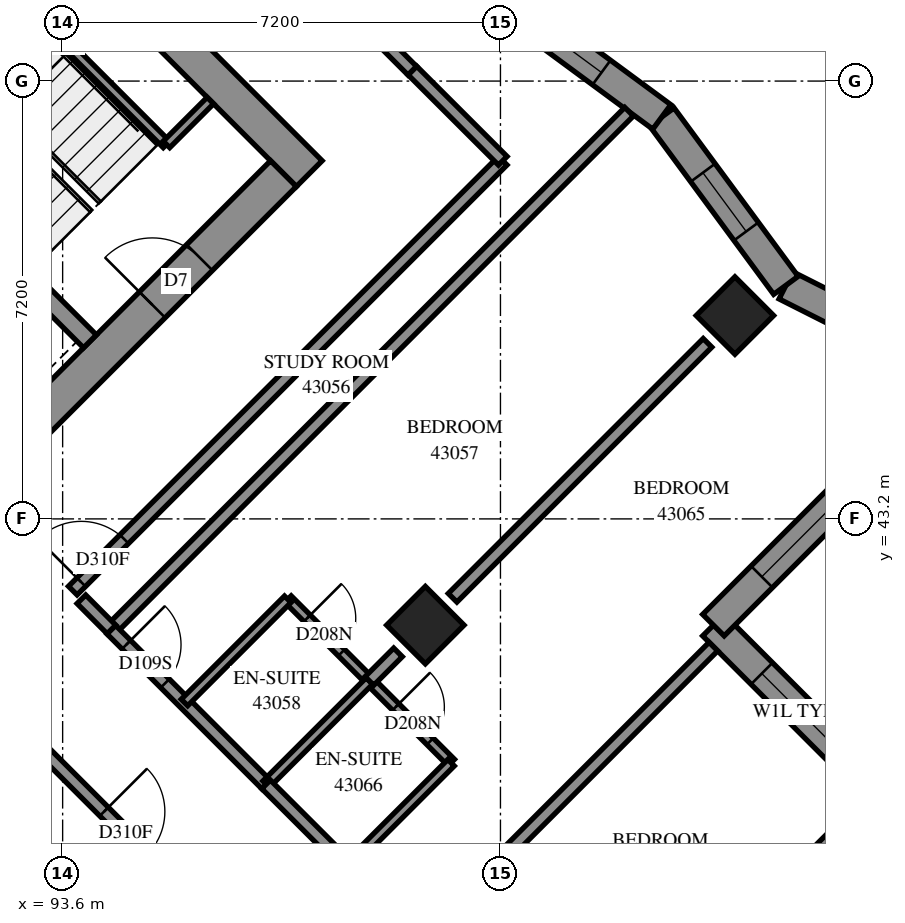
"""IFC4 building model, lengths in metres.
Left out: names, types, materials, properties, quantities, classifications, styles, units other than length and angle.
Written with IfcOpenShell. Run it as: python <this file> out.ifc"""

import sys

from ifc_helpers import new_model, si_unit, direction, frame, frame_2d, origin, origin_2d, place, context, subcontext, project, spatial, polyline, rectangle, outline, extrude, element, fill, save


model = new_model("IFC4")
c1 = context("Model", 3, precision=1e-05, world=origin(), true_north=direction((0.0, 1.0)))
c2 = subcontext(c1, "Body", "Model", "MODEL_VIEW")
j1 = project(units=[si_unit("LENGTHUNIT", "METRE"), si_unit("PLANEANGLEUNIT", "RADIAN")], contexts=[c1])
p1 = place(None, origin())
s1 = spatial("IfcSite", under=j1, at=p1, CompositionType="ELEMENT")
p2 = place(p1, origin())
s2 = spatial("IfcBuilding", under=s1, at=p2, CompositionType="ELEMENT")
p3 = place(p2, frame((0.0, 0.0, 159.2)))
s3 = spatial("IfcBuildingStorey", under=s2, at=p3, CompositionType="ELEMENT", Elevation=159.2)
for number, where, z_axis, x_axis in (
    (1, (104.656, 46.544, 0.0), (0.0, 0.0, 1.0), (0.707, -0.707, 0.0)),
    (2, (99.565, 41.453, 0.0), (0.0, 0.0, 1.0), (0.707, -0.707, 0.0)),
):
    element("IfcColumn", number, at=place(p3, frame(where, z_axis=z_axis, x_axis=x_axis)), inside=s3, PredefinedType="COLUMN", context=c2, shape_type="SweptSolid", body=[
        extrude(rectangle(XDim=0.9, YDim=0.9, at=origin_2d()), origin(), (0.0, 0.0, 1.0), 3.1),
    ])
p4 = place(p3, frame((86.625, 59.908, -0.3), z_axis=(0.0, 0.0, 1.0), x_axis=(0.7071067812, -0.7071067812, 0.0)))
e3 = element("IfcWall", 3, at=p4, inside=s3, PredefinedType="SHEAR", context=c2, shape_type="SweptSolid", body=[
    extrude(rectangle(XDim=15.6, YDim=0.6, at=frame_2d((7.8, 0.0))), origin(), (0.0, 0.0, 1.0), 2.7),
])
p5 = place(p4, frame((10.6, 0.0, 0.3)))
e4 = element("IfcOpeningElement", 4, at=p5, cuts=e3, PredefinedType="OPENING", context=c2, shape_type="SweptSolid", body=[
    extrude(rectangle(XDim=0.8, YDim=2.1, at=frame_2d((0.4, 1.05))), frame((0.0, 0.31, 0.0), z_axis=(0.0, -1.0, 0.0), x_axis=(1.0, 0.0, 0.0)), (0.0, 0.0, 1.0), 0.62),
])
p6 = place(p3, frame((87.049, 38.695, -0.3), z_axis=(0.0, 0.0, 1.0), x_axis=(0.7071067812, 0.7071067812, 0.0)))
e5 = element("IfcWall", 5, at=p6, inside=s3, PredefinedType="SHEAR", context=c2, shape_type="SweptSolid", body=[
    extrude(rectangle(XDim=14.4, YDim=0.6, at=frame_2d((7.2, 0.0))), origin(), (0.0, 0.0, 1.0), 2.7),
])
p7 = place(p6, frame((4.55, 0.0, 0.3)))
e6 = element("IfcOpeningElement", 6, at=p7, cuts=e5, PredefinedType="OPENING", context=c2, shape_type="SweptSolid", body=[
    extrude(rectangle(XDim=1.1, YDim=2.1, at=frame_2d((0.55, 1.05))), frame((0.0, 0.31, 0.0), z_axis=(0.0, -1.0, 0.0), x_axis=(1.0, 0.0, 0.0)), (0.0, 0.0, 1.0), 0.62),
])
p8 = place(p6, frame((11.35, 0.0, 0.3)))
e7 = element("IfcOpeningElement", 7, at=p8, cuts=e5, PredefinedType="OPENING", context=c2, shape_type="SweptSolid", body=[
    extrude(rectangle(XDim=1.1, YDim=2.1, at=frame_2d((0.55, 1.05))), frame((0.0, 0.31, 0.0), z_axis=(0.0, -1.0, 0.0), x_axis=(1.0, 0.0, 0.0)), (0.0, 0.0, 1.0), 0.62),
])
p9 = place(p3, frame((88.958, 51.211, 0.0), z_axis=(0.0, 0.0, 1.0), x_axis=(0.7070998367, -0.7071137256, 0.0)))
e8 = element("IfcWall", 8, at=p9, inside=s3, PredefinedType="SOLIDWALL", context=c2, shape_type="SweptSolid", body=[
    extrude(rectangle(XDim=7.2, YDim=0.3, at=frame_2d((3.6, 0.0))), origin(), (0.0, 0.0, 1.0), 3.1),
])
p10 = place(p3, frame((105.959, 32.962, 0.0), z_axis=(0.0, 0.0, 1.0), x_axis=(0.3371362761, 0.9414558574, 0.0)))
e9 = element("IfcWall", 9, at=p10, inside=s3, PredefinedType="SOLIDWALL", context=c2, shape_type="SweptSolid", body=[
    extrude(outline(polyline([(-0.113, -0.25), (5.503, -0.25), (5.187, 0.25), (0.113, 0.25), (-0.113, -0.25)])), origin(), (0.0, 0.0, 1.0), 3.1),
])
p11 = place(p10, frame((1.17, 0.0, 0.45)))
e10 = element("IfcOpeningElement", 10, at=p11, cuts=e9, PredefinedType="OPENING", context=c2, shape_type="SweptSolid", body=[
    extrude(rectangle(XDim=1.2, YDim=2.5, at=frame_2d((0.6, 1.25))), frame((0.0, 0.26, 0.0), z_axis=(0.0, -1.0, 0.0), x_axis=(1.0, 0.0, 0.0)), (0.0, 0.0, 1.0), 0.52),
])
p12 = place(p10, frame((3.507, 0.0, 0.45)))
e11 = element("IfcOpeningElement", 11, at=p12, cuts=e9, PredefinedType="OPENING", context=c2, shape_type="SweptSolid", body=[
    extrude(rectangle(XDim=1.2, YDim=2.5, at=frame_2d((0.6, 1.25))), frame((0.0, 0.26, 0.0), z_axis=(0.0, -1.0, 0.0), x_axis=(1.0, 0.0, 0.0)), (0.0, 0.0, 1.0), 0.52),
])
p13 = place(p3, frame((107.761, 37.994, 0.0), z_axis=(0.0, 0.0, 1.0), x_axis=(-0.7071170025, 0.7070965597, 0.0)))
e12 = element("IfcWall", 12, at=p13, inside=s3, PredefinedType="SOLIDWALL", context=c2, shape_type="SweptSolid", body=[
    extrude(outline(polyline([(-0.158, -0.25), (4.642, -0.25), (5.142, 0.25), (0.158, 0.25), (-0.158, -0.25)])), origin(), (0.0, 0.0, 1.0), 3.1),
])
p14 = place(p13, frame((1.967, 0.0, 0.6)))
e13 = element("IfcOpeningElement", 13, at=p14, cuts=e12, PredefinedType="OPENING", context=c2, shape_type="SweptSolid", body=[
    extrude(rectangle(XDim=1.8, YDim=1.9, at=frame_2d((0.9, 0.95))), frame((0.0, 0.26, 0.0), z_axis=(0.0, -1.0, 0.0), x_axis=(1.0, 0.0, 0.0)), (0.0, 0.0, 1.0), 0.52),
])
p15 = place(p3, frame((104.302, 41.453, 0.0), z_axis=(0.0, 0.0, 1.0), x_axis=(0.707123973, 0.707089589, 0.0)))
e14 = element("IfcWall", 14, at=p15, inside=s3, PredefinedType="SOLIDWALL", context=c2, shape_type="SweptSolid", body=[
    extrude(outline(polyline([(0.25, -0.25), (6.162, -0.25), (5.471, 0.25), (-0.25, 0.25), (0.25, -0.25)])), origin(), (0.0, 0.0, 1.0), 3.1),
])
p16 = place(p15, frame((1.125, 0.0, 0.6)))
e15 = element("IfcOpeningElement", 15, at=p16, cuts=e14, PredefinedType="OPENING", context=c2, shape_type="SweptSolid", body=[
    extrude(rectangle(XDim=1.8, YDim=1.9, at=frame_2d((0.9, 0.95))), frame((0.0, 0.26, 0.0), z_axis=(0.0, -1.0, 0.0), x_axis=(1.0, 0.0, 0.0)), (0.0, 0.0, 1.0), 0.52),
])
p17 = place(p15, frame((3.961, 0.0, 0.6)))
e16 = element("IfcOpeningElement", 16, at=p17, cuts=e14, PredefinedType="OPENING", context=c2, shape_type="SweptSolid", body=[
    extrude(rectangle(XDim=1.2, YDim=1.9, at=frame_2d((0.6, 0.95))), frame((0.0, 0.26, 0.0), z_axis=(0.0, -1.0, 0.0), x_axis=(1.0, 0.0, 0.0)), (0.0, 0.0, 1.0), 0.52),
])
p18 = place(p3, frame((108.415, 45.566, 0.0), z_axis=(0.0, 0.0, 1.0), x_axis=(-0.8926785051, 0.4506940054, 0.0)))
e17 = element("IfcWall", 17, at=p18, inside=s3, PredefinedType="SOLIDWALL", context=c2, shape_type="SweptSolid", body=[
    extrude(outline(polyline([(-0.345, -0.25), (3.213, -0.25), (3.332, 0.25), (0.345, 0.25), (-0.345, -0.25)])), origin(), (0.0, 0.0, 1.0), 3.1),
])
p19 = place(p18, frame((1.209, 0.0, 0.45)))
e18 = element("IfcOpeningElement", 18, at=p19, cuts=e17, PredefinedType="OPENING", context=c2, shape_type="SweptSolid", body=[
    extrude(rectangle(XDim=1.2, YDim=2.5, at=frame_2d((0.6, 1.25))), frame((0.0, 0.26, 0.0), z_axis=(0.0, -1.0, 0.0), x_axis=(1.0, 0.0, 0.0)), (0.0, 0.0, 1.0), 0.52),
])
p20 = place(p3, frame((105.494, 47.041, 0.0), z_axis=(0.0, 0.0, 1.0), x_axis=(-0.5932158949, 0.8050434162, 0.0)))
e19 = element("IfcWall", 19, at=p20, inside=s3, PredefinedType="SOLIDWALL", context=c2, shape_type="SweptSolid", body=[
    extrude(outline(polyline([(0.06, -0.25), (3.478, -0.25), (3.402, 0.25), (-0.06, 0.25), (0.06, -0.25)])), origin(), (0.0, 0.0, 1.0), 3.1),
])
p21 = place(p20, frame((1.101, 0.0, 0.45)))
e20 = element("IfcOpeningElement", 20, at=p21, cuts=e19, PredefinedType="OPENING", context=c2, shape_type="SweptSolid", body=[
    extrude(rectangle(XDim=1.2, YDim=2.5, at=frame_2d((0.6, 1.25))), frame((0.0, 0.26, 0.0), z_axis=(0.0, -1.0, 0.0), x_axis=(1.0, 0.0, 0.0)), (0.0, 0.0, 1.0), 0.52),
])
p22 = place(p3, frame((103.454, 49.81, 0.0), z_axis=(0.0, 0.0, 1.0), x_axis=(-0.8050440725, 0.5932150043, 0.0)))
e21 = element("IfcWall", 21, at=p22, inside=s3, PredefinedType="SOLIDWALL", context=c2, shape_type="SweptSolid", body=[
    extrude(outline(polyline([(-0.038, -0.25), (3.381, -0.25), (3.456, 0.25), (0.038, 0.25), (-0.038, -0.25)])), origin(), (0.0, 0.0, 1.0), 3.1),
])
p23 = place(p22, frame((1.232, 0.0, 0.45)))
e22 = element("IfcOpeningElement", 22, at=p23, cuts=e21, PredefinedType="OPENING", context=c2, shape_type="SweptSolid", body=[
    extrude(rectangle(XDim=1.2, YDim=2.5, at=frame_2d((0.6, 1.25))), frame((0.0, 0.26, 0.0), z_axis=(0.0, -1.0, 0.0), x_axis=(1.0, 0.0, 0.0)), (0.0, 0.0, 1.0), 0.52),
])
p24 = place(p3, frame((91.313, 53.354, 0.0), z_axis=(0.0, 0.0, 1.0), x_axis=(0.7071067812, -0.7071067812, 0.0)))
e23 = element("IfcWall", 23, at=p24, inside=s3, PredefinedType="PARTITIONING", context=c2, shape_type="SweptSolid", body=[
    extrude(rectangle(XDim=5.65, YDim=0.15, at=frame_2d((2.825, 0.0))), origin(), (0.0, 0.0, 1.0), 3.1),
])
p25 = place(p3, frame((95.308, 49.358, 0.0), z_axis=(0.0, 0.0, 1.0), x_axis=(0.70705776, 0.707155799, 0.0)))
e24 = element("IfcWall", 24, at=p25, inside=s3, PredefinedType="PARTITIONING", context=c2, shape_type="SweptSolid", body=[
    extrude(rectangle(XDim=1.02, YDim=0.15, at=frame_2d((0.51, 0.0))), origin(), (0.0, 0.0, 1.0), 3.1),
])
p26 = place(p3, frame((94.401, 41.383, 0.0), z_axis=(0.0, 0.0, 1.0), x_axis=(0.7071067812, 0.7071067812, 0.0)))
e25 = element("IfcWall", 25, at=p26, inside=s3, PredefinedType="PARTITIONING", context=c2, shape_type="SweptSolid", body=[
    extrude(rectangle(XDim=12.04, YDim=0.2, at=frame_2d((6.02, 0.0))), origin(), (0.0, 0.0, 1.0), 3.1),
])
p27 = place(p3, frame((92.209, 40.459, 0.0), z_axis=(0.0, 0.0, 1.0), x_axis=(0.7071067812, -0.7071067812, 0.0)))
e26 = element("IfcWall", 26, at=p27, inside=s3, PredefinedType="PARTITIONING", context=c2, shape_type="SweptSolid", body=[
    extrude(rectangle(XDim=11.698, YDim=0.2, at=frame_2d((5.849, 0.0))), origin(), (0.0, 0.0, 1.0), 3.1),
])
p28 = place(p27, frame((2.931, 0.0, 0.0)))
e27 = element("IfcOpeningElement", 27, at=p28, cuts=e26, PredefinedType="OPENING", context=c2, shape_type="SweptSolid", body=[
    extrude(rectangle(XDim=1.0, YDim=2.1, at=frame_2d((0.5, 1.05))), frame((0.0, 0.11, 0.0), z_axis=(0.0, -1.0, 0.0), x_axis=(1.0, 0.0, 0.0)), (0.0, 0.0, 1.0), 0.22),
])
p29 = place(p27, frame((10.223, 0.0, 0.0)))
e28 = element("IfcOpeningElement", 28, at=p29, cuts=e26, PredefinedType="OPENING", context=c2, shape_type="SweptSolid", body=[
    extrude(rectangle(XDim=0.9, YDim=2.1, at=frame_2d((0.45, 1.05))), frame((0.0, 0.11, 0.0), z_axis=(0.0, -1.0, 0.0), x_axis=(1.0, 0.0, 0.0)), (0.0, 0.0, 1.0), 0.22),
])
p30 = place(p3, frame((93.767, 42.021, 0.0), z_axis=(0.0, 0.0, 1.0), x_axis=(0.7071067812, 0.7071067812, 0.0)))
e29 = element("IfcWall", 29, at=p30, inside=s3, PredefinedType="PARTITIONING", context=c2, shape_type="SweptSolid", body=[
    extrude(rectangle(XDim=9.998, YDim=0.2, at=frame_2d((4.999, 0.0))), origin(), (0.0, 0.0, 1.0), 3.1),
])
p31 = place(p30, frame((0.196, 0.0, 0.0)))
e30 = element("IfcOpeningElement", 30, at=p31, cuts=e29, PredefinedType="OPENING", context=c2, shape_type="SweptSolid", body=[
    extrude(rectangle(XDim=1.0, YDim=2.1, at=frame_2d((0.5, 1.05))), frame((0.0, 0.11, 0.0), z_axis=(0.0, -1.0, 0.0), x_axis=(1.0, 0.0, 0.0)), (0.0, 0.0, 1.0), 0.22),
])
p32 = place(p3, frame((99.494, 36.292, 0.0), z_axis=(0.0, 0.0, 1.0), x_axis=(0.7071067812, 0.7071067812, 0.0)))
e31 = element("IfcWall", 31, at=p32, inside=s3, PredefinedType="PARTITIONING", context=c2, shape_type="SweptSolid", body=[
    extrude(rectangle(XDim=6.799, YDim=0.2, at=frame_2d((3.4, 0.0))), origin(), (0.0, 0.0, 1.0), 3.1),
])
p33 = place(p3, frame((100.013, 41.903, 0.0), z_axis=(0.0, 0.0, 1.0), x_axis=(0.7071067812, 0.7071067812, 0.0)))
e32 = element("IfcWall", 32, at=p33, inside=s3, PredefinedType="PARTITIONING", context=c2, shape_type="SweptSolid", body=[
    extrude(rectangle(XDim=5.928, YDim=0.2, at=frame_2d((2.964, 0.0))), origin(), (0.0, 0.0, 1.0), 3.1),
])
p34 = place(p3, frame((97.305, 41.881, 0.0), z_axis=(0.0, 0.0, 1.0), x_axis=(0.7067382634, -0.707475107, 0.0)))
e33 = element("IfcWall", 33, at=p34, inside=s3, PredefinedType="PARTITIONING", context=c2, shape_type="SweptSolid", body=[
    extrude(rectangle(XDim=3.8, YDim=0.15, at=frame_2d((1.9, 0.0))), origin(), (0.0, 0.0, 1.0), 3.1),
])
p35 = place(p34, frame((0.445, 0.0, 0.0)))
e34 = element("IfcOpeningElement", 34, at=p35, cuts=e33, PredefinedType="OPENING", context=c2, shape_type="SweptSolid", body=[
    extrude(rectangle(XDim=0.8, YDim=2.1, at=frame_2d((0.4, 1.05))), frame((0.0, 0.085, 0.0), z_axis=(0.0, -1.0, 0.0), x_axis=(1.0, 0.0, 0.0)), (0.0, 0.0, 1.0), 0.17),
])
p36 = place(p34, frame((2.507, 0.0, 0.0)))
e35 = element("IfcOpeningElement", 35, at=p36, cuts=e33, PredefinedType="OPENING", context=c2, shape_type="SweptSolid", body=[
    extrude(rectangle(XDim=0.8, YDim=2.1, at=frame_2d((0.4, 1.05))), frame((0.0, 0.085, 0.0), z_axis=(0.0, -1.0, 0.0), x_axis=(1.0, 0.0, 0.0)), (0.0, 0.0, 1.0), 0.17),
])
p37 = place(p3, frame((94.399, 41.379, 0.0), z_axis=(0.0, 0.0, 1.0), x_axis=(0.7071067812, -0.7071067812, 0.0)))
e36 = element("IfcWall", 36, at=p37, inside=s3, PredefinedType="PARTITIONING", context=c2, shape_type="SweptSolid", body=[
    extrude(rectangle(XDim=3.601, YDim=0.2, at=frame_2d((1.8, 0.0))), origin(), (0.0, 0.0, 1.0), 3.1),
])
p38 = place(p37, frame((0.35, 0.0, 0.0)))
e37 = element("IfcOpeningElement", 37, at=p38, cuts=e36, PredefinedType="OPENING", context=c2, shape_type="SweptSolid", body=[
    extrude(rectangle(XDim=0.9, YDim=2.1, at=frame_2d((0.45, 1.05))), frame((0.0, 0.11, 0.0), z_axis=(0.0, -1.0, 0.0), x_axis=(1.0, 0.0, 0.0)), (0.0, 0.0, 1.0), 0.22),
])
p39 = place(p3, frame((105.105, 36.813, 0.0), z_axis=(0.0, 0.0, 1.0), x_axis=(0.7071067812, 0.7071067812, 0.0)))
e38 = element("IfcWall", 38, at=p39, inside=s3, PredefinedType="PARTITIONING", context=c2, shape_type="SweptSolid", body=[
    extrude(rectangle(XDim=2.463, YDim=0.2, at=frame_2d((1.232, 0.0))), origin(), (0.0, 0.0, 1.0), 3.1),
])
for number, where, z_axis, x_axis in (
    (39, (95.603, 40.181, 0.0), (0.0, 0.0, 1.0), (0.707, 0.707, 0.0)),
    (40, (96.947, 38.837, 0.0), (0.0, 0.0, 1.0), (0.707, 0.707, 0.0)),
):
    element("IfcWall", number, at=place(p3, frame(where, z_axis=z_axis, x_axis=x_axis)), inside=s3, PredefinedType="PARTITIONING", context=c2, shape_type="SweptSolid", body=[
        extrude(rectangle(XDim=2.401, YDim=0.15, at=frame_2d((1.201, 0.0))), origin(), (0.0, 0.0, 1.0), 3.1),
    ])
p40 = place(p3, frame((98.291, 37.495, 0.0), z_axis=(0.0, 0.0, 1.0), x_axis=(0.7071067812, 0.7071067812, 0.0)))
e41 = element("IfcWall", 41, at=p40, inside=s3, PredefinedType="PARTITIONING", context=c2, shape_type="SweptSolid", body=[
    extrude(rectangle(XDim=2.398, YDim=0.15, at=frame_2d((1.199, 0.0))), origin(), (0.0, 0.0, 1.0), 3.1),
])
p41 = place(p3, frame((99.352, 50.574, 0.0), z_axis=(0.0, 0.0, 1.0), x_axis=(0.7075827869, -0.7066304548, 0.0)))
e42 = element("IfcWall", 42, at=p41, inside=s3, PredefinedType="PARTITIONING", context=c2, shape_type="SweptSolid", body=[
    extrude(rectangle(XDim=2.1, YDim=0.2, at=frame_2d((1.05, 0.0))), origin(), (0.0, 0.0, 1.0), 3.1),
])
p42 = place(p3, frame((96.946, 38.834, 0.0), z_axis=(0.0, 0.0, 1.0), x_axis=(0.7076330979, -0.7065800724, 0.0)))
e43 = element("IfcWall", 43, at=p42, inside=s3, PredefinedType="PARTITIONING", context=c2, shape_type="SweptSolid", body=[
    extrude(rectangle(XDim=1.899, YDim=0.2, at=frame_2d((0.95, 0.0))), origin(), (0.0, 0.0, 1.0), 3.1),
])
p43 = place(p3, frame((93.909, 41.879, 0.0), z_axis=(0.0, 0.0, 1.0), x_axis=(0.7056768426, -0.7085338339, 0.0)))
e44 = element("IfcWall", 44, at=p43, inside=s3, PredefinedType="PARTITIONING", context=c2, shape_type="SweptSolid", body=[
    extrude(rectangle(XDim=0.7, YDim=0.2, at=frame_2d((0.35, 0.0))), origin(), (0.0, 0.0, 1.0), 3.1),
])
p44 = place(p3, frame((98.645, 40.535, 0.0), z_axis=(0.0, 0.0, 1.0), x_axis=(0.7071067812, 0.7071067812, 0.0)))
e45 = element("IfcWall", 45, at=p44, inside=s3, PredefinedType="PARTITIONING", context=c2, shape_type="SweptSolid", body=[
    extrude(rectangle(XDim=0.665, YDim=0.2, at=frame_2d((0.332, 0.0))), origin(), (0.0, 0.0, 1.0), 3.1),
])
p45 = place(p3, frame((98.925, 50.995, 0.0), z_axis=(0.0, 0.0, 1.0), x_axis=(0.7071067812, -0.7071067812, 0.0)))
e46 = element("IfcWall", 46, at=p45, inside=s3, PredefinedType="PARTITIONING", context=c2, shape_type="SweptSolid", body=[
    extrude(rectangle(XDim=0.6, YDim=0.2, at=frame_2d((0.3, 0.0))), origin(), (0.0, 0.0, 1.0), 3.1),
])
p46 = place(p14, origin())
e47 = element("IfcWindow", 47, at=p46, inside=s3, PartitioningType="SINGLE_PANEL", PredefinedType="WINDOW", context=c2, shape_type="SweptSolid", body=[
    extrude(rectangle(XDim=1.8, YDim=1.9, at=frame_2d((0.9, 0.95))), frame((0.0, 0.18, 0.0), z_axis=(0.0, -1.0, 0.0), x_axis=(1.0, 0.0, 0.0)), (0.0, 0.0, 1.0), 0.06),
])
fill(e13, e47)
p47 = place(p16, origin())
e48 = element("IfcWindow", 48, at=p47, inside=s3, PartitioningType="SINGLE_PANEL", PredefinedType="WINDOW", context=c2, shape_type="SweptSolid", body=[
    extrude(rectangle(XDim=1.8, YDim=1.9, at=frame_2d((0.9, 0.95))), frame((0.0, 0.18, 0.0), z_axis=(0.0, -1.0, 0.0), x_axis=(1.0, 0.0, 0.0)), (0.0, 0.0, 1.0), 0.06),
])
fill(e15, e48)
p48 = place(p21, origin())
e49 = element("IfcWindow", 49, at=p48, inside=s3, PartitioningType="SINGLE_PANEL", PredefinedType="WINDOW", context=c2, shape_type="SweptSolid", body=[
    extrude(rectangle(XDim=1.2, YDim=2.5, at=frame_2d((0.6, 1.25))), frame((0.0, 0.18, 0.0), z_axis=(0.0, -1.0, 0.0), x_axis=(1.0, 0.0, 0.0)), (0.0, 0.0, 1.0), 0.06),
])
fill(e20, e49)
p49 = place(p23, origin())
e50 = element("IfcWindow", 50, at=p49, inside=s3, PartitioningType="SINGLE_PANEL", PredefinedType="WINDOW", context=c2, shape_type="SweptSolid", body=[
    extrude(rectangle(XDim=1.2, YDim=2.5, at=frame_2d((0.6, 1.25))), frame((0.0, 0.18, 0.0), z_axis=(0.0, -1.0, 0.0), x_axis=(1.0, 0.0, 0.0)), (0.0, 0.0, 1.0), 0.06),
])
fill(e22, e50)
p50 = place(p8, origin())
e51 = element("IfcDoor", 51, at=p50, inside=s3, OperationType="SINGLE_SWING_RIGHT", PredefinedType="DOOR", context=c2, shape_type="SweptSolid", body=[
    extrude(rectangle(XDim=1.1, YDim=2.1, at=frame_2d((0.55, 1.05))), frame((0.0, 0.025, 0.0), z_axis=(0.0, -1.0, 0.0), x_axis=(1.0, 0.0, 0.0)), (0.0, 0.0, 1.0), 0.05),
])
fill(e7, e51)
p51 = place(p31, origin())
e52 = element("IfcDoor", 52, at=p51, inside=s3, OperationType="SINGLE_SWING_LEFT", PredefinedType="DOOR", context=c2, shape_type="SweptSolid", body=[
    extrude(rectangle(XDim=1.0, YDim=2.1, at=frame_2d((0.5, 1.05))), frame((0.0, 0.025, 0.0), z_axis=(0.0, -1.0, 0.0), x_axis=(1.0, 0.0, 0.0)), (0.0, 0.0, 1.0), 0.05),
])
fill(e30, e52)
p52 = place(p38, origin())
e53 = element("IfcDoor", 53, at=p52, inside=s3, OperationType="SINGLE_SWING_RIGHT", PredefinedType="DOOR", context=c2, shape_type="SweptSolid", body=[
    extrude(rectangle(XDim=0.9, YDim=2.1, at=frame_2d((0.45, 1.05))), frame((0.0, 0.025, 0.0), z_axis=(0.0, -1.0, 0.0), x_axis=(1.0, 0.0, 0.0)), (0.0, 0.0, 1.0), 0.05),
])
fill(e37, e53)
p53 = place(p35, origin())
e54 = element("IfcDoor", 54, at=p53, inside=s3, OperationType="SINGLE_SWING_RIGHT", PredefinedType="DOOR", context=c2, shape_type="SweptSolid", body=[
    extrude(rectangle(XDim=0.8, YDim=2.1, at=frame_2d((0.4, 1.05))), frame((0.0, 0.025, 0.0), z_axis=(0.0, -1.0, 0.0), x_axis=(1.0, 0.0, 0.0)), (0.0, 0.0, 1.0), 0.05),
])
fill(e34, e54)
p54 = place(p28, origin())
e55 = element("IfcDoor", 55, at=p54, inside=s3, OperationType="SINGLE_SWING_LEFT", PredefinedType="DOOR", context=c2, shape_type="SweptSolid", body=[
    extrude(rectangle(XDim=1.0, YDim=2.1, at=frame_2d((0.5, 1.05))), frame((0.0, 0.025, 0.0), z_axis=(0.0, -1.0, 0.0), x_axis=(1.0, 0.0, 0.0)), (0.0, 0.0, 1.0), 0.05),
])
fill(e27, e55)
p55 = place(p36, origin())
e56 = element("IfcDoor", 56, at=p55, inside=s3, OperationType="SINGLE_SWING_RIGHT", PredefinedType="DOOR", context=c2, shape_type="SweptSolid", body=[
    extrude(rectangle(XDim=0.8, YDim=2.1, at=frame_2d((0.4, 1.05))), frame((0.0, 0.025, 0.0), z_axis=(0.0, -1.0, 0.0), x_axis=(1.0, 0.0, 0.0)), (0.0, 0.0, 1.0), 0.05),
])
fill(e35, e56)
save(model, sys.argv[1])
